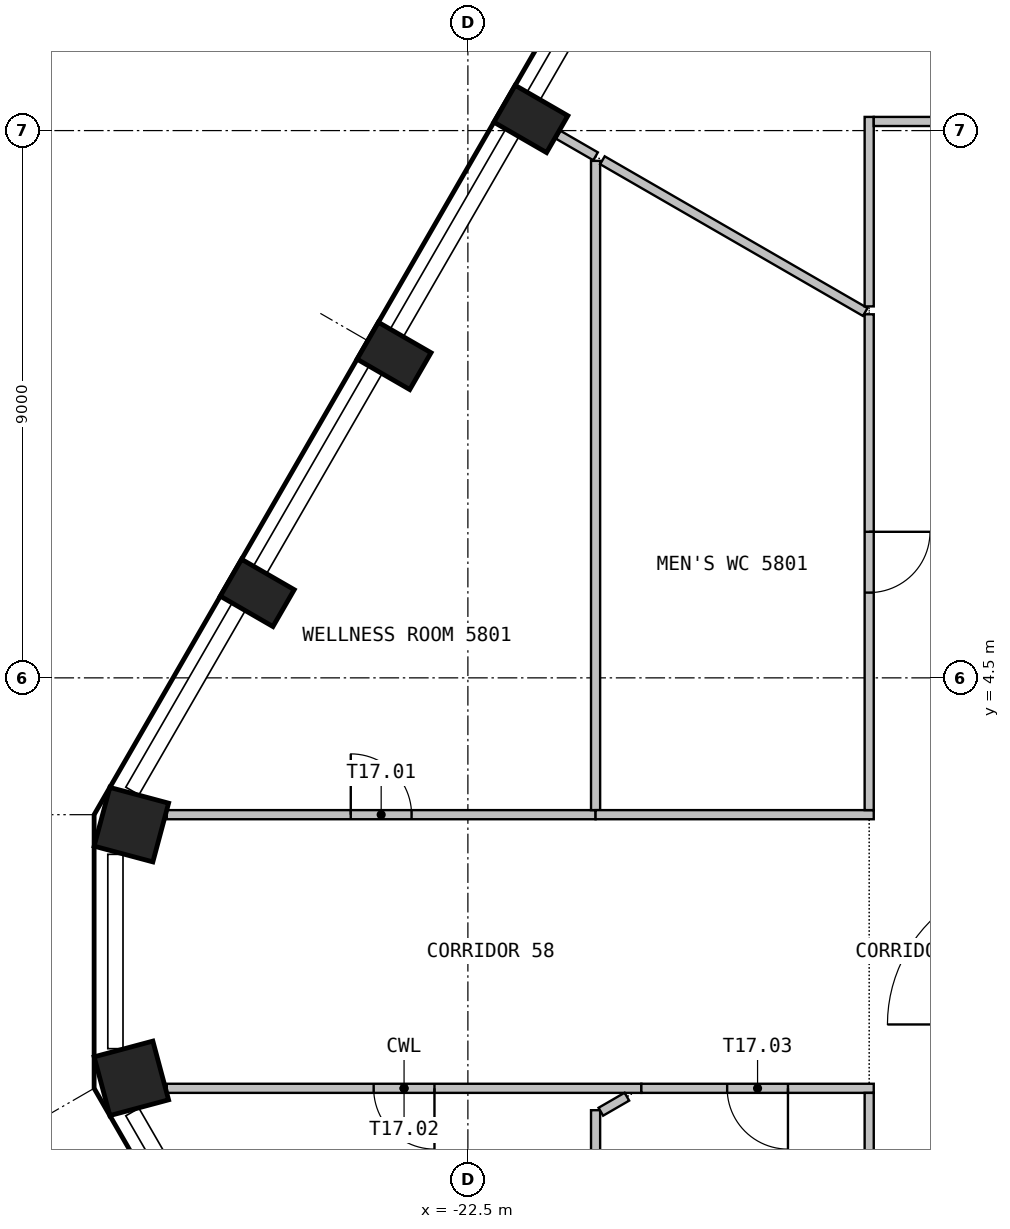
"""IFC4 building model, lengths in metres.
Left out: names, types, materials, properties, quantities, classifications, styles, units other than length and angle.
Written with IfcOpenShell. Run it as: python <this file> out.ifc"""

import sys

from ifc_helpers import new_model, si_unit, direction, frame, frame_2d, origin, origin_2d, place, context, subcontext, project, spatial, rectangle, extrude, element, fill, save


model = new_model("IFC4")
c1 = context("Model", 3, precision=1e-05, world=origin(), true_north=direction((0.0, 1.0)))
c2 = subcontext(c1, "Body", "Model", "MODEL_VIEW")
j1 = project(units=[si_unit("LENGTHUNIT", "METRE"), si_unit("PLANEANGLEUNIT", "RADIAN")], contexts=[c1])
p1 = place(None, origin())
s1 = spatial("IfcSite", under=j1, at=p1, CompositionType="ELEMENT")
p2 = place(p1, origin())
s2 = spatial("IfcBuilding", under=s1, at=p2, CompositionType="ELEMENT")
p3 = place(p2, frame((0.0, 0.0, 235.2)))
s3 = spatial("IfcBuildingStorey", under=s2, at=p3, CompositionType="ELEMENT", Elevation=235.2)
for number, where, z_axis, x_axis in (
    (1, (-21.464, 13.691, 0.0), (0.0, 0.0, 1.0), (-0.5, -0.866, 0.0)),
    (2, (-23.714, 9.794, 0.0), (0.0, 0.0, 1.0), (-0.5, -0.866, 0.0)),
    (3, (-25.964, 5.897, 0.0), (0.0, 0.0, 1.0), (-0.5, -0.866, 0.0)),
):
    element("IfcColumn", number, at=place(p3, frame(where, z_axis=z_axis, x_axis=x_axis)), inside=s3, PredefinedType="COLUMN", context=c2, shape_type="SweptSolid", body=[
        extrude(rectangle(XDim=0.7, YDim=1.0, at=origin_2d()), origin(), (0.0, 0.0, 1.0), 3.575),
    ])
for number, where, z_axis, x_axis in (
    (4, (-28.035, 2.086, 0.0), (0.0, 0.0, 1.0), (-0.259, -0.966, 0.0)),
    (5, (-28.035, -2.086, 0.0), (0.0, 0.0, 1.0), (0.259, -0.966, 0.0)),
):
    element("IfcColumn", number, at=place(p3, frame(where, z_axis=z_axis, x_axis=x_axis)), inside=s3, PredefinedType="COLUMN", context=c2, shape_type="SweptSolid", body=[
        extrude(rectangle(XDim=1.0, YDim=1.0, at=origin_2d()), origin(), (0.0, 0.0, 1.0), 3.575),
    ])
p4 = place(p3, frame((-19.647, -2.25, 0.0), z_axis=(0.0, 0.0, 1.0), x_axis=(-1.0, 0.0, 0.0)))
e6 = element("IfcWall", 6, at=p4, inside=s3, PredefinedType="PARTITIONING", context=c2, shape_type="SweptSolid", body=[
    extrude(rectangle(XDim=7.805, YDim=0.15, at=frame_2d((3.903, 0.0))), origin(), (0.0, 0.0, 1.0), 3.575),
])
p5 = place(p4, frame((3.403, 0.0, 0.0)))
e7 = element("IfcOpeningElement", 7, at=p5, cuts=e6, PredefinedType="OPENING", context=c2, shape_type="SweptSolid", body=[
    extrude(rectangle(XDim=1.0, YDim=2.1, at=frame_2d((0.5, 1.05))), frame((0.0, 0.085, 0.0), z_axis=(0.0, -1.0, 0.0), x_axis=(1.0, 0.0, 0.0)), (0.0, 0.0, 1.0), 0.17),
])
p6 = place(p3, frame((-27.452, 2.25, 0.0), z_axis=(0.0, 0.0, 1.0), x_axis=(1.0, 0.0, 0.0)))
e8 = element("IfcWall", 8, at=p6, inside=s3, PredefinedType="PARTITIONING", context=c2, shape_type="SweptSolid", body=[
    extrude(rectangle(XDim=7.052, YDim=0.15, at=frame_2d((3.526, 0.0))), origin(), (0.0, 0.0, 1.0), 3.575),
])
p7 = place(p6, frame((3.026, 0.0, 0.0)))
e9 = element("IfcOpeningElement", 9, at=p7, cuts=e8, PredefinedType="OPENING", context=c2, shape_type="SweptSolid", body=[
    extrude(rectangle(XDim=1.0, YDim=2.1, at=frame_2d((0.5, 1.05))), frame((0.0, 0.085, 0.0), z_axis=(0.0, -1.0, 0.0), x_axis=(1.0, 0.0, 0.0)), (0.0, 0.0, 1.0), 0.17),
])
p8 = place(p3, frame((-21.014, 13.431, 0.0), z_axis=(0.0, 0.0, 1.0), x_axis=(0.866030760678, -0.499990721473, 0.0)))
e10 = element("IfcWall", 10, at=p8, inside=s3, PredefinedType="PARTITIONING", context=c2, shape_type="SweptSolid", body=[
    extrude(rectangle(XDim=0.709, YDim=0.15, at=frame_2d((0.354, 0.0))), origin(), (0.0, 0.0, 1.0), 3.575),
])
p9 = place(p3, frame((-20.4, -2.61, 0.0), z_axis=(0.0, 0.0, 1.0), x_axis=(0.0, -1.0, 0.0)))
e11 = element("IfcWall", 11, at=p9, inside=s3, PredefinedType="PARTITIONING", context=c2, shape_type="SweptSolid", body=[
    extrude(rectangle(XDim=2.847, YDim=0.15, at=frame_2d((1.423, 0.0))), origin(), (0.0, 0.0, 1.0), 3.575),
])
p10 = place(p3, frame((-19.885, -2.387, 0.0), z_axis=(0.0, 0.0, 1.0), x_axis=(-0.865865073245, -0.500277597875, 0.0)))
e12 = element("IfcWall", 12, at=p10, inside=s3, PredefinedType="PARTITIONING", context=c2, shape_type="SweptSolid", body=[
    extrude(rectangle(XDim=0.495, YDim=0.15, at=frame_2d((0.248, 0.0))), origin(), (0.0, 0.0, 1.0), 3.575),
])
p11 = place(p3, frame((-20.4, 13.002, 0.0), z_axis=(0.0, 0.0, 1.0), x_axis=(0.0, -1.0, 0.0)))
e13 = element("IfcWall", 13, at=p11, inside=s3, PredefinedType="PARTITIONING", context=c2, shape_type="SweptSolid", body=[
    extrude(rectangle(XDim=10.677, YDim=0.15, at=frame_2d((5.338, 0.0))), origin(), (0.0, 0.0, 1.0), 3.575),
])
p12 = place(p3, frame((-20.4, 2.25, 0.0), z_axis=(0.0, 0.0, 1.0), x_axis=(1.0, 0.0, 0.0)))
e14 = element("IfcWall", 14, at=p12, inside=s3, PredefinedType="PARTITIONING", context=c2, shape_type="SweptSolid", body=[
    extrude(rectangle(XDim=4.575, YDim=0.15, at=frame_2d((2.288, 0.0))), origin(), (0.0, 0.0, 1.0), 3.575),
])
p13 = place(p3, frame((-20.287, 13.012, 0.0), z_axis=(0.0, 0.0, 1.0), x_axis=(0.866034070548, -0.499984988425, 0.0)))
e15 = element("IfcWall", 15, at=p13, inside=s3, PredefinedType="PARTITIONING", context=c2, shape_type="SweptSolid", body=[
    extrude(rectangle(XDim=4.991, YDim=0.15, at=frame_2d((2.496, 0.0))), origin(), (0.0, 0.0, 1.0), 3.575),
])
p14 = place(p3, frame((-15.825, -2.25, 0.0), z_axis=(0.0, 0.0, 1.0), x_axis=(-1.0, 0.0, 0.0)))
e16 = element("IfcWall", 16, at=p14, inside=s3, PredefinedType="PARTITIONING", context=c2, shape_type="SweptSolid", body=[
    extrude(rectangle(XDim=3.822, YDim=0.15, at=frame_2d((1.911, 0.0))), origin(), (0.0, 0.0, 1.0), 3.575),
])
p15 = place(p14, frame((1.411, 0.0, 0.0)))
e17 = element("IfcOpeningElement", 17, at=p15, cuts=e16, PredefinedType="OPENING", context=c2, shape_type="SweptSolid", body=[
    extrude(rectangle(XDim=1.0, YDim=2.1, at=frame_2d((0.5, 1.05))), frame((0.0, 0.085, 0.0), z_axis=(0.0, -1.0, 0.0), x_axis=(1.0, 0.0, 0.0)), (0.0, 0.0, 1.0), 0.17),
])
p16 = place(p3, frame((-15.9, -2.325, 0.0), z_axis=(0.0, 0.0, 1.0), x_axis=(0.0, -1.0, 0.0)))
e18 = element("IfcWall", 18, at=p16, inside=s3, PredefinedType="PARTITIONING", context=c2, shape_type="SweptSolid", body=[
    extrude(rectangle(XDim=1.183, YDim=0.15, at=frame_2d((0.592, 0.0))), origin(), (0.0, 0.0, 1.0), 3.575),
])
p17 = place(p3, frame((-15.9, 10.479, 0.0), z_axis=(0.0, 0.0, 1.0), x_axis=(0.0, -1.0, 0.0)))
e19 = element("IfcWall", 19, at=p17, inside=s3, PredefinedType="PARTITIONING", context=c2, shape_type="SweptSolid", body=[
    extrude(rectangle(XDim=8.154, YDim=0.15, at=frame_2d((4.077, 0.0))), origin(), (0.0, 0.0, 1.0), 3.575),
])
p18 = place(p17, frame((3.577, 0.0, 0.0)))
e20 = element("IfcOpeningElement", 20, at=p18, cuts=e19, PredefinedType="OPENING", context=c2, shape_type="SweptSolid", body=[
    extrude(rectangle(XDim=1.0, YDim=2.1, at=frame_2d((0.5, 1.05))), frame((0.0, 0.085, 0.0), z_axis=(0.0, -1.0, 0.0), x_axis=(1.0, 0.0, 0.0)), (0.0, 0.0, 1.0), 0.17),
])
p19 = place(p3, frame((-15.9, 13.725, 0.0), z_axis=(0.0, 0.0, 1.0), x_axis=(0.0, -1.0, 0.0)))
e21 = element("IfcWall", 21, at=p19, inside=s3, PredefinedType="PARTITIONING", context=c2, shape_type="SweptSolid", body=[
    extrude(rectangle(XDim=3.116, YDim=0.15, at=frame_2d((1.558, 0.0))), origin(), (0.0, 0.0, 1.0), 3.575),
])
p20 = place(p3, frame((-11.25, 13.65, 0.0), z_axis=(0.0, 0.0, 1.0), x_axis=(-1.0, 0.0, 0.0)))
e22 = element("IfcWall", 22, at=p20, inside=s3, PredefinedType="PARTITIONING", context=c2, shape_type="SweptSolid", body=[
    extrude(rectangle(XDim=4.575, YDim=0.15, at=frame_2d((2.288, 0.0))), origin(), (0.0, 0.0, 1.0), 3.575),
])
p21 = place(p20, frame((1.788, 0.0, 0.0)))
e23 = element("IfcOpeningElement", 23, at=p21, cuts=e22, PredefinedType="OPENING", context=c2, shape_type="SweptSolid", body=[
    extrude(rectangle(XDim=1.0, YDim=2.1, at=frame_2d((0.5, 1.05))), frame((0.0, 0.085, 0.0), z_axis=(0.0, -1.0, 0.0), x_axis=(1.0, 0.0, 0.0)), (0.0, 0.0, 1.0), 0.17),
])
p22 = place(p7, origin())
e24 = element("IfcDoor", 24, at=p22, inside=s3, OperationType="SINGLE_SWING_LEFT", PredefinedType="DOOR", context=c2, shape_type="SweptSolid", body=[
    extrude(rectangle(XDim=1.0, YDim=2.1, at=frame_2d((0.5, 1.05))), frame((0.0, 0.025, 0.0), z_axis=(0.0, -1.0, 0.0), x_axis=(1.0, 0.0, 0.0)), (0.0, 0.0, 1.0), 0.05),
])
fill(e9, e24)
p23 = place(p5, origin())
e25 = element("IfcDoor", 25, at=p23, inside=s3, OperationType="SINGLE_SWING_RIGHT", PredefinedType="DOOR", context=c2, shape_type="SweptSolid", body=[
    extrude(rectangle(XDim=1.0, YDim=2.1, at=frame_2d((0.5, 1.05))), frame((0.0, 0.025, 0.0), z_axis=(0.0, -1.0, 0.0), x_axis=(1.0, 0.0, 0.0)), (0.0, 0.0, 1.0), 0.05),
])
fill(e7, e25)
p24 = place(p15, origin())
e26 = element("IfcDoor", 26, at=p24, inside=s3, OperationType="SINGLE_SWING_RIGHT", PredefinedType="DOOR", context=c2, shape_type="SweptSolid", body=[
    extrude(rectangle(XDim=1.0, YDim=2.1, at=frame_2d((0.5, 1.05))), frame((0.0, 0.025, 0.0), z_axis=(0.0, -1.0, 0.0), x_axis=(1.0, 0.0, 0.0)), (0.0, 0.0, 1.0), 0.05),
])
fill(e17, e26)
p25 = place(p18, origin())
e27 = element("IfcDoor", 27, at=p25, inside=s3, OperationType="SINGLE_SWING_LEFT", PredefinedType="DOOR", context=c2, shape_type="SweptSolid", body=[
    extrude(rectangle(XDim=1.0, YDim=2.1, at=frame_2d((0.5, 1.05))), frame((0.0, 0.025, 0.0), z_axis=(0.0, -1.0, 0.0), x_axis=(1.0, 0.0, 0.0)), (0.0, 0.0, 1.0), 0.05),
])
fill(e20, e27)
save(model, sys.argv[1])
